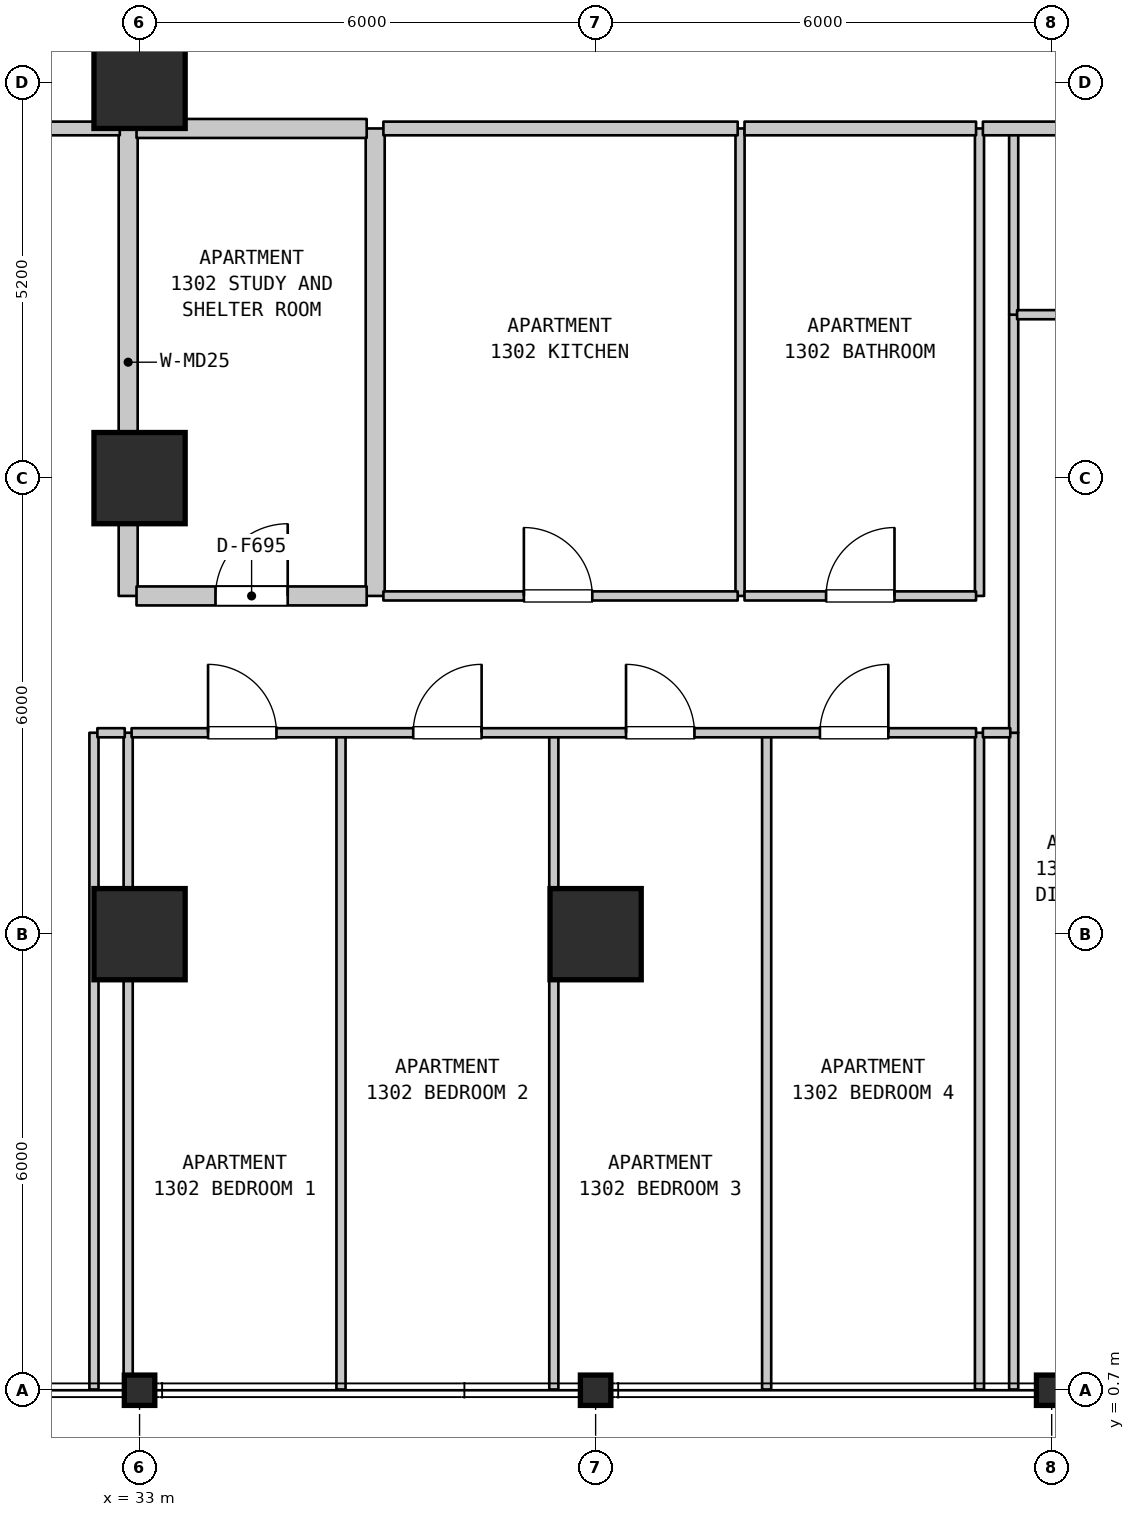
"""IFC4 building model, lengths in metres.
Left out: names, types, materials, properties, quantities, classifications, styles, units other than length and angle.
Written with IfcOpenShell. Run it as: python <this file> out.ifc"""

import sys

from ifc_helpers import new_model, si_unit, direction, frame, frame_2d, origin, origin_2d, place, context, subcontext, project, spatial, rectangle, i_section, extrude, element, fill, save


model = new_model("IFC4")
c1 = context("Model", 3, precision=1e-05, world=origin(), true_north=direction((0.0, 1.0)))
c2 = subcontext(c1, "Body", "Model", "MODEL_VIEW")
j1 = project(units=[si_unit("LENGTHUNIT", "METRE"), si_unit("PLANEANGLEUNIT", "RADIAN")], contexts=[c1])
p1 = place(None, origin())
s1 = spatial("IfcSite", under=j1, at=p1, CompositionType="ELEMENT")
p2 = place(p1, origin())
s2 = spatial("IfcBuilding", under=s1, at=p2, CompositionType="ELEMENT")
p3 = place(p2, frame((0.0, 0.0, 57.3)))
s3 = spatial("IfcBuildingStorey", under=s2, at=p3, CompositionType="ELEMENT", Elevation=57.3)
p4 = place(p3, frame((33.0, 0.7, 0.0), z_axis=(0.0, 0.0, 1.0), x_axis=(1.0, 0.0, 0.0)))
e1 = element("IfcColumn", 1, at=p4, inside=s3, PredefinedType="COLUMN", context=c2, shape_type="SweptSolid", body=[
    extrude(i_section(OverallWidth=0.401, OverallDepth=0.399, WebThickness=0.025, FlangeThickness=0.04, FilletRadius=0.015, at=origin_2d()), origin(), (0.0, 0.0, 1.0), 3.7),
])
for number, where, z_axis, x_axis in (
    (2, (33.0, 6.7, 0.0), (0.0, 0.0, 1.0), (1.0, 0.0, 0.0)),
    (3, (33.0, 12.7, 0.0), (0.0, 0.0, 1.0), (1.0, 0.0, 0.0)),
    (4, (33.0, 17.9, 0.0), (0.0, 0.0, 1.0), (1.0, 0.0, 0.0)),
):
    element("IfcColumn", number, at=place(p3, frame(where, z_axis=z_axis, x_axis=x_axis)), inside=s3, PredefinedType="COLUMN", context=c2, shape_type="SweptSolid", body=[
        extrude(rectangle(XDim=1.2, YDim=1.2, at=origin_2d()), origin(), (0.0, 0.0, 1.0), 3.7),
    ])
p5 = place(p3, frame((39.0, 0.7, 0.0), z_axis=(0.0, 0.0, 1.0), x_axis=(1.0, 0.0, 0.0)))
e5 = element("IfcColumn", 5, at=p5, inside=s3, PredefinedType="COLUMN", context=c2, shape_type="SweptSolid", body=[
    extrude(i_section(OverallWidth=0.401, OverallDepth=0.399, WebThickness=0.025, FlangeThickness=0.04, FilletRadius=0.015, at=origin_2d()), origin(), (0.0, 0.0, 1.0), 3.7),
])
p6 = place(p3, frame((39.0, 6.7, 0.0), z_axis=(0.0, 0.0, 1.0), x_axis=(1.0, 0.0, 0.0)))
e6 = element("IfcColumn", 6, at=p6, inside=s3, PredefinedType="COLUMN", context=c2, shape_type="SweptSolid", body=[
    extrude(rectangle(XDim=1.2, YDim=1.2, at=origin_2d()), origin(), (0.0, 0.0, 1.0), 3.7),
])
p7 = place(p3, frame((45.0, 0.7, 0.0), z_axis=(0.0, 0.0, 1.0), x_axis=(1.0, 0.0, 0.0)))
e7 = element("IfcColumn", 7, at=p7, inside=s3, PredefinedType="COLUMN", context=c2, shape_type="SweptSolid", body=[
    extrude(i_section(OverallWidth=0.401, OverallDepth=0.399, WebThickness=0.025, FlangeThickness=0.04, FilletRadius=0.015, at=origin_2d()), origin(), (0.0, 0.0, 1.0), 3.7),
])
for number, where, z_axis, x_axis in (
    (8, (32.4, 0.71, 0.0), (0.0, 0.0, 1.0), (0.0, 1.0, 0.0)),
    (9, (32.85, 0.71, 0.0), (0.0, 0.0, 1.0), (0.0, 1.0, 0.0)),
):
    element("IfcWall", number, at=place(p3, frame(where, z_axis=z_axis, x_axis=x_axis)), inside=s3, PredefinedType="PARTITIONING", context=c2, shape_type="SweptSolid", body=[
        extrude(rectangle(XDim=8.64, YDim=0.12, at=frame_2d((4.32, 0.0))), origin(), (0.0, 0.0, 1.0), 3.28),
    ])
p8 = place(p3, frame((32.85, 11.15, 0.0), z_axis=(0.0, 0.0, 1.0), x_axis=(0.0, 1.0, 0.0)))
e10 = element("IfcWall", 10, at=p8, inside=s3, PredefinedType="STANDARD", context=c2, shape_type="SweptSolid", body=[
    extrude(rectangle(XDim=6.15, YDim=0.25, at=frame_2d((3.075, 0.0))), origin(), (0.0, 0.0, 1.0), 3.28),
])
p9 = place(p3, frame((35.65, 0.71, 0.0), z_axis=(0.0, 0.0, 1.0), x_axis=(0.0, 1.0, 0.0)))
e11 = element("IfcWall", 11, at=p9, inside=s3, PredefinedType="PARTITIONING", context=c2, shape_type="SweptSolid", body=[
    extrude(rectangle(XDim=8.64, YDim=0.12, at=frame_2d((4.32, 0.0))), origin(), (0.0, 0.0, 1.0), 3.28),
])
p10 = place(p3, frame((36.1, 11.15, 0.0), z_axis=(0.0, 0.0, 1.0), x_axis=(0.0, 1.0, 0.0)))
e12 = element("IfcWall", 12, at=p10, inside=s3, PredefinedType="STANDARD", context=c2, shape_type="SweptSolid", body=[
    extrude(rectangle(XDim=6.15, YDim=0.25, at=frame_2d((3.075, 0.0))), origin(), (0.0, 0.0, 1.0), 3.28),
])
p11 = place(p3, frame((38.45, 0.71, 0.0), z_axis=(0.0, 0.0, 1.0), x_axis=(0.0, 1.0, 0.0)))
e13 = element("IfcWall", 13, at=p11, inside=s3, PredefinedType="PARTITIONING", context=c2, shape_type="SweptSolid", body=[
    extrude(rectangle(XDim=8.64, YDim=0.12, at=frame_2d((4.32, 0.0))), origin(), (0.0, 0.0, 1.0), 3.28),
])
p12 = place(p3, frame((40.9, 11.15, 0.0), z_axis=(0.0, 0.0, 1.0), x_axis=(0.0, 1.0, 0.0)))
e14 = element("IfcWall", 14, at=p12, inside=s3, PredefinedType="PARTITIONING", context=c2, shape_type="SweptSolid", body=[
    extrude(rectangle(XDim=6.15, YDim=0.12, at=frame_2d((3.075, 0.0))), origin(), (0.0, 0.0, 1.0), 3.28),
])
for number, where, z_axis, x_axis in (
    (15, (41.25, 0.71, 0.0), (0.0, 0.0, 1.0), (0.0, 1.0, 0.0)),
    (16, (44.05, 0.71, 0.0), (0.0, 0.0, 1.0), (0.0, 1.0, 0.0)),
):
    element("IfcWall", number, at=place(p3, frame(where, z_axis=z_axis, x_axis=x_axis)), inside=s3, PredefinedType="PARTITIONING", context=c2, shape_type="SweptSolid", body=[
        extrude(rectangle(XDim=8.64, YDim=0.12, at=frame_2d((4.32, 0.0))), origin(), (0.0, 0.0, 1.0), 3.28),
    ])
p13 = place(p3, frame((44.05, 11.15, 0.0), z_axis=(0.0, 0.0, 1.0), x_axis=(0.0, 1.0, 0.0)))
e17 = element("IfcWall", 17, at=p13, inside=s3, PredefinedType="PARTITIONING", context=c2, shape_type="SweptSolid", body=[
    extrude(rectangle(XDim=6.15, YDim=0.12, at=frame_2d((3.075, 0.0))), origin(), (0.0, 0.0, 1.0), 3.28),
])
p14 = place(p3, frame((44.5, 0.71, 0.0), z_axis=(0.0, 0.0, 1.0), x_axis=(0.0, 1.0, 0.0)))
e18 = element("IfcWall", 18, at=p14, inside=s3, PredefinedType="PARTITIONING", context=c2, shape_type="SweptSolid", body=[
    extrude(rectangle(XDim=8.64, YDim=0.12, at=frame_2d((4.32, 0.0))), origin(), (0.0, 0.0, 1.0), 3.28),
])
p15 = place(p3, frame((44.5, 9.35, 0.0), z_axis=(0.0, 0.0, 1.0), x_axis=(0.0, 1.0, 0.0)))
e19 = element("IfcWall", 19, at=p15, inside=s3, PredefinedType="PARTITIONING", context=c2, shape_type="SweptSolid", body=[
    extrude(rectangle(XDim=5.5, YDim=0.12, at=frame_2d((2.75, 0.0))), origin(), (0.0, 0.0, 1.0), 3.28),
])
p16 = place(p3, frame((44.5, 14.85, 0.0), z_axis=(0.0, 0.0, 1.0), x_axis=(0.0, 1.0, 0.0)))
e20 = element("IfcWall", 20, at=p16, inside=s3, PredefinedType="PARTITIONING", context=c2, shape_type="SweptSolid", body=[
    extrude(rectangle(XDim=2.45, YDim=0.12, at=frame_2d((1.225, 0.0))), origin(), (0.0, 0.0, 1.0), 3.28),
])
p17 = place(p3, frame((32.445, 9.35, 0.0), z_axis=(0.0, 0.0, 1.0), x_axis=(1.0, 0.0, 0.0)))
e21 = element("IfcWall", 21, at=p17, inside=s3, PredefinedType="PARTITIONING", context=c2, shape_type="SweptSolid", body=[
    extrude(rectangle(XDim=0.36, YDim=0.12, at=frame_2d((0.18, 0.0))), origin(), (0.0, 0.0, 1.0), 3.28),
])
p18 = place(p3, frame((32.895, 9.35, 0.0), z_axis=(0.0, 0.0, 1.0), x_axis=(1.0, 0.0, 0.0)))
e22 = element("IfcWall", 22, at=p18, inside=s3, PredefinedType="PARTITIONING", context=c2, shape_type="SweptSolid", body=[
    extrude(rectangle(XDim=11.11, YDim=0.12, at=frame_2d((5.555, 0.0))), origin(), (0.0, 0.0, 1.0), 3.28),
])
p19 = place(p18, frame((1.006, 0.0, 0.0)))
e23 = element("IfcOpeningElement", 23, at=p19, cuts=e22, PredefinedType="OPENING", context=c2, shape_type="SweptSolid", body=[
    extrude(rectangle(XDim=0.9, YDim=2.15, at=frame_2d((0.45, 1.075))), frame((0.0, 0.07, 0.0), z_axis=(0.0, -1.0, 0.0), x_axis=(1.0, 0.0, 0.0)), (0.0, 0.0, 1.0), 0.14),
])
p20 = place(p18, frame((3.705, 0.0, 0.0)))
e24 = element("IfcOpeningElement", 24, at=p20, cuts=e22, PredefinedType="OPENING", context=c2, shape_type="SweptSolid", body=[
    extrude(rectangle(XDim=0.9, YDim=2.15, at=frame_2d((0.45, 1.075))), frame((0.0, 0.07, 0.0), z_axis=(0.0, -1.0, 0.0), x_axis=(1.0, 0.0, 0.0)), (0.0, 0.0, 1.0), 0.14),
])
p21 = place(p18, frame((6.505, 0.0, 0.0)))
e25 = element("IfcOpeningElement", 25, at=p21, cuts=e22, PredefinedType="OPENING", context=c2, shape_type="SweptSolid", body=[
    extrude(rectangle(XDim=0.9, YDim=2.15, at=frame_2d((0.45, 1.075))), frame((0.0, 0.07, 0.0), z_axis=(0.0, -1.0, 0.0), x_axis=(1.0, 0.0, 0.0)), (0.0, 0.0, 1.0), 0.14),
])
p22 = place(p18, frame((9.056, 0.0, 0.0)))
e26 = element("IfcOpeningElement", 26, at=p22, cuts=e22, PredefinedType="OPENING", context=c2, shape_type="SweptSolid", body=[
    extrude(rectangle(XDim=0.9, YDim=2.15, at=frame_2d((0.45, 1.075))), frame((0.0, 0.07, 0.0), z_axis=(0.0, -1.0, 0.0), x_axis=(1.0, 0.0, 0.0)), (0.0, 0.0, 1.0), 0.14),
])
p23 = place(p3, frame((44.095, 9.35, 0.0), z_axis=(0.0, 0.0, 1.0), x_axis=(1.0, 0.0, 0.0)))
e27 = element("IfcWall", 27, at=p23, inside=s3, PredefinedType="PARTITIONING", context=c2, shape_type="SweptSolid", body=[
    extrude(rectangle(XDim=0.36, YDim=0.12, at=frame_2d((0.18, 0.0))), origin(), (0.0, 0.0, 1.0), 3.28),
])
p24 = place(p3, frame((32.96, 11.15, 0.0), z_axis=(0.0, 0.0, 1.0), x_axis=(1.0, 0.0, 0.0)))
e28 = element("IfcWall", 28, at=p24, inside=s3, PredefinedType="STANDARD", context=c2, shape_type="SweptSolid", body=[
    extrude(rectangle(XDim=3.028, YDim=0.25, at=frame_2d((1.514, 0.0))), origin(), (0.0, 0.0, 1.0), 3.28),
])
p25 = place(p24, frame((1.039, 0.0, 0.0)))
e29 = element("IfcOpeningElement", 29, at=p25, cuts=e28, PredefinedType="OPENING", context=c2, shape_type="SweptSolid", body=[
    extrude(rectangle(XDim=0.95, YDim=2.15, at=frame_2d((0.475, 1.075))), frame((0.0, 0.135, 0.0), z_axis=(0.0, -1.0, 0.0), x_axis=(1.0, 0.0, 0.0)), (0.0, 0.0, 1.0), 0.27),
])
p26 = place(p3, frame((36.208, 11.15, 0.0), z_axis=(0.0, 0.0, 1.0), x_axis=(1.0, 0.0, 0.0)))
e30 = element("IfcWall", 30, at=p26, inside=s3, PredefinedType="PARTITIONING", context=c2, shape_type="SweptSolid", body=[
    extrude(rectangle(XDim=4.661, YDim=0.12, at=frame_2d((2.331, 0.0))), origin(), (0.0, 0.0, 1.0), 3.28),
])
p27 = place(p26, frame((1.848, 0.0, 0.0)))
e31 = element("IfcOpeningElement", 31, at=p27, cuts=e30, PredefinedType="OPENING", context=c2, shape_type="SweptSolid", body=[
    extrude(rectangle(XDim=0.9, YDim=2.15, at=frame_2d((0.45, 1.075))), frame((0.0, 0.07, 0.0), z_axis=(0.0, -1.0, 0.0), x_axis=(1.0, 0.0, 0.0)), (0.0, 0.0, 1.0), 0.14),
])
p28 = place(p3, frame((40.959, 11.15, 0.0), z_axis=(0.0, 0.0, 1.0), x_axis=(1.0, 0.0, 0.0)))
e32 = element("IfcWall", 32, at=p28, inside=s3, PredefinedType="PARTITIONING", context=c2, shape_type="SweptSolid", body=[
    extrude(rectangle(XDim=3.046, YDim=0.12, at=frame_2d((1.523, 0.0))), origin(), (0.0, 0.0, 1.0), 3.28),
])
p29 = place(p28, frame((1.073, 0.0, 0.0)))
e33 = element("IfcOpeningElement", 33, at=p29, cuts=e32, PredefinedType="OPENING", context=c2, shape_type="SweptSolid", body=[
    extrude(rectangle(XDim=0.9, YDim=2.1, at=frame_2d((0.45, 1.05))), frame((0.0, 0.07, 0.0), z_axis=(0.0, -1.0, 0.0), x_axis=(1.0, 0.0, 0.0)), (0.0, 0.0, 1.0), 0.14),
])
p30 = place(p3, frame((44.545, 14.85, 0.0), z_axis=(0.0, 0.0, 1.0), x_axis=(1.0, 0.0, 0.0)))
e34 = element("IfcWall", 34, at=p30, inside=s3, PredefinedType="PARTITIONING", context=c2, shape_type="SweptSolid", body=[
    extrude(rectangle(XDim=2.16, YDim=0.12, at=frame_2d((1.08, 0.0))), origin(), (0.0, 0.0, 1.0), 3.28),
])
p31 = place(p30, frame((0.553, 0.0, 0.0)))
e35 = element("IfcOpeningElement", 35, at=p31, cuts=e34, PredefinedType="OPENING", context=c2, shape_type="SweptSolid", body=[
    extrude(rectangle(XDim=0.9, YDim=2.15, at=frame_2d((0.45, 1.075))), frame((0.0, 0.07, 0.0), z_axis=(0.0, -1.0, 0.0), x_axis=(1.0, 0.0, 0.0)), (0.0, 0.0, 1.0), 0.14),
])
p32 = place(p3, frame((27.645, 17.3, 0.0), z_axis=(0.0, 0.0, 1.0), x_axis=(1.0, 0.0, 0.0)))
e36 = element("IfcWall", 36, at=p32, inside=s3, PredefinedType="STANDARD", context=c2, shape_type="SweptSolid", body=[
    extrude(rectangle(XDim=5.095, YDim=0.18, at=frame_2d((2.547, 0.0))), origin(), (0.0, 0.0, 1.0), 3.28),
])
p33 = place(p32, frame((2.08, 0.0, 0.0)))
e37 = element("IfcOpeningElement", 37, at=p33, cuts=e36, PredefinedType="OPENING", context=c2, shape_type="SweptSolid", body=[
    extrude(rectangle(XDim=1.0, YDim=2.15, at=frame_2d((0.5, 1.075))), frame((0.0, 0.1, 0.0), z_axis=(0.0, -1.0, 0.0), x_axis=(1.0, 0.0, 0.0)), (0.0, 0.0, 1.0), 0.2),
])
p34 = place(p3, frame((32.96, 17.3, 0.0), z_axis=(0.0, 0.0, 1.0), x_axis=(1.0, 0.0, 0.0)))
e38 = element("IfcWall", 38, at=p34, inside=s3, PredefinedType="STANDARD", context=c2, shape_type="SweptSolid", body=[
    extrude(rectangle(XDim=3.028, YDim=0.25, at=frame_2d((1.514, 0.0))), origin(), (0.0, 0.0, 1.0), 3.28),
])
p35 = place(p3, frame((36.208, 17.3, 0.0), z_axis=(0.0, 0.0, 1.0), x_axis=(1.0, 0.0, 0.0)))
e39 = element("IfcWall", 39, at=p35, inside=s3, PredefinedType="STANDARD", context=c2, shape_type="SweptSolid", body=[
    extrude(rectangle(XDim=4.661, YDim=0.18, at=frame_2d((2.331, 0.0))), origin(), (0.0, 0.0, 1.0), 3.28),
])
p36 = place(p3, frame((40.959, 17.3, 0.0), z_axis=(0.0, 0.0, 1.0), x_axis=(1.0, 0.0, 0.0)))
e40 = element("IfcWall", 40, at=p36, inside=s3, PredefinedType="STANDARD", context=c2, shape_type="SweptSolid", body=[
    extrude(rectangle(XDim=3.046, YDim=0.18, at=frame_2d((1.523, 0.0))), origin(), (0.0, 0.0, 1.0), 3.28),
])
p37 = place(p3, frame((44.095, 17.3, 0.0), z_axis=(0.0, 0.0, 1.0), x_axis=(1.0, 0.0, 0.0)))
e41 = element("IfcWall", 41, at=p37, inside=s3, PredefinedType="STANDARD", context=c2, shape_type="SweptSolid", body=[
    extrude(rectangle(XDim=5.545, YDim=0.18, at=frame_2d((2.772, 0.0))), origin(), (0.0, 0.0, 1.0), 3.28),
])
p38 = place(p37, frame((2.305, 0.0, 0.0)))
e42 = element("IfcOpeningElement", 42, at=p38, cuts=e41, PredefinedType="OPENING", context=c2, shape_type="SweptSolid", body=[
    extrude(rectangle(XDim=1.0, YDim=2.15, at=frame_2d((0.5, 1.075))), frame((0.0, 0.1, 0.0), z_axis=(0.0, -1.0, 0.0), x_axis=(1.0, 0.0, 0.0)), (0.0, 0.0, 1.0), 0.2),
])
p39 = place(p19, origin())
e43 = element("IfcDoor", 43, at=p39, inside=s3, OperationType="SINGLE_SWING_LEFT", PredefinedType="DOOR", context=c2, shape_type="SweptSolid", body=[
    extrude(rectangle(XDim=0.9, YDim=2.15, at=frame_2d((0.45, 1.075))), frame((0.0, 0.025, 0.0), z_axis=(0.0, -1.0, 0.0), x_axis=(1.0, 0.0, 0.0)), (0.0, 0.0, 1.0), 0.05),
])
fill(e23, e43)
p40 = place(p20, origin())
e44 = element("IfcDoor", 44, at=p40, inside=s3, OperationType="SINGLE_SWING_RIGHT", PredefinedType="DOOR", context=c2, shape_type="SweptSolid", body=[
    extrude(rectangle(XDim=0.9, YDim=2.15, at=frame_2d((0.45, 1.075))), frame((0.0, 0.025, 0.0), z_axis=(0.0, -1.0, 0.0), x_axis=(1.0, 0.0, 0.0)), (0.0, 0.0, 1.0), 0.05),
])
fill(e24, e44)
p41 = place(p21, origin())
e45 = element("IfcDoor", 45, at=p41, inside=s3, OperationType="SINGLE_SWING_LEFT", PredefinedType="DOOR", context=c2, shape_type="SweptSolid", body=[
    extrude(rectangle(XDim=0.9, YDim=2.15, at=frame_2d((0.45, 1.075))), frame((0.0, 0.025, 0.0), z_axis=(0.0, -1.0, 0.0), x_axis=(1.0, 0.0, 0.0)), (0.0, 0.0, 1.0), 0.05),
])
fill(e25, e45)
p42 = place(p22, origin())
e46 = element("IfcDoor", 46, at=p42, inside=s3, OperationType="SINGLE_SWING_RIGHT", PredefinedType="DOOR", context=c2, shape_type="SweptSolid", body=[
    extrude(rectangle(XDim=0.9, YDim=2.15, at=frame_2d((0.45, 1.075))), frame((0.0, 0.025, 0.0), z_axis=(0.0, -1.0, 0.0), x_axis=(1.0, 0.0, 0.0)), (0.0, 0.0, 1.0), 0.05),
])
fill(e26, e46)
p43 = place(p25, origin())
e47 = element("IfcDoor", 47, at=p43, inside=s3, OperationType="SINGLE_SWING_RIGHT", PredefinedType="DOOR", context=c2, shape_type="SweptSolid", body=[
    extrude(rectangle(XDim=0.95, YDim=2.15, at=frame_2d((0.475, 1.075))), frame((0.0, 0.025, 0.0), z_axis=(0.0, -1.0, 0.0), x_axis=(1.0, 0.0, 0.0)), (0.0, 0.0, 1.0), 0.05),
])
fill(e29, e47)
p44 = place(p27, origin())
e48 = element("IfcDoor", 48, at=p44, inside=s3, OperationType="SINGLE_SWING_LEFT", PredefinedType="DOOR", context=c2, shape_type="SweptSolid", body=[
    extrude(rectangle(XDim=0.9, YDim=2.15, at=frame_2d((0.45, 1.075))), frame((0.0, 0.025, 0.0), z_axis=(0.0, -1.0, 0.0), x_axis=(1.0, 0.0, 0.0)), (0.0, 0.0, 1.0), 0.05),
])
fill(e31, e48)
p45 = place(p29, origin())
e49 = element("IfcDoor", 49, at=p45, inside=s3, OperationType="SINGLE_SWING_RIGHT", PredefinedType="DOOR", context=c2, shape_type="SweptSolid", body=[
    extrude(rectangle(XDim=0.9, YDim=2.1, at=frame_2d((0.45, 1.05))), frame((0.0, 0.025, 0.0), z_axis=(0.0, -1.0, 0.0), x_axis=(1.0, 0.0, 0.0)), (0.0, 0.0, 1.0), 0.05),
])
fill(e33, e49)
save(model, sys.argv[1])
